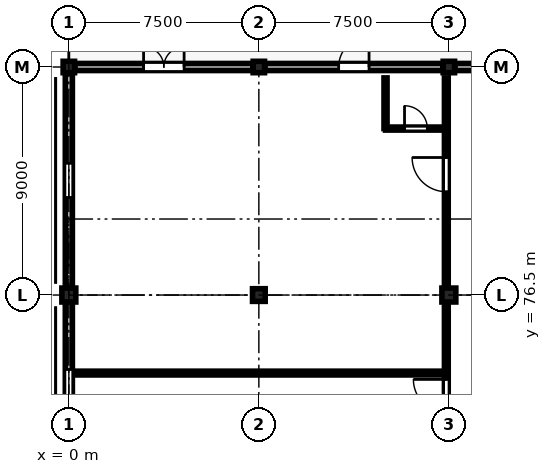
"""IFC4 building model, lengths in metres.
Left out: names, types, materials, properties, quantities, classifications, styles, units other than length and angle.
Written with IfcOpenShell. Run it as: python <this file> out.ifc"""

import sys

from ifc_helpers import new_model, si_unit, direction, frame, frame_2d, origin, origin_2d, place, context, subcontext, project, spatial, rectangle, extrude, element, fill, save


model = new_model("IFC4")
c1 = context("Model", 3, precision=1e-05, world=origin(), true_north=direction((0.0, 1.0)))
c2 = subcontext(c1, "Body", "Model", "MODEL_VIEW")
j1 = project(units=[si_unit("LENGTHUNIT", "METRE"), si_unit("PLANEANGLEUNIT", "RADIAN")], contexts=[c1])
p1 = place(None, origin())
s1 = spatial("IfcSite", under=j1, at=p1, CompositionType="ELEMENT")
p2 = place(p1, origin())
s2 = spatial("IfcBuilding", under=s1, at=p2, CompositionType="ELEMENT")
p3 = place(p2, frame((0.0, 0.0, 25.95)))
s3 = spatial("IfcBuildingStorey", under=s2, at=p3, CompositionType="ELEMENT", Elevation=25.95)
p4 = place(p3, frame((0.0, 76.5, 0.0), z_axis=(0.0, 0.0, 1.0), x_axis=(1.0, 0.0, 0.0)))
e1 = element("IfcColumn", 1, at=p4, inside=s3, PredefinedType="COLUMN", context=c2, shape_type="SweptSolid", body=[
    extrude(rectangle(XDim=0.55, YDim=0.55, at=origin_2d()), origin(), (0.0, 0.0, 1.0), 4.05),
])
p5 = place(p3, frame((0.0, 85.5, 0.0), z_axis=(0.0, 0.0, 1.0), x_axis=(1.0, 0.0, 0.0)))
e2 = element("IfcColumn", 2, at=p5, inside=s3, PredefinedType="COLUMN", context=c2, shape_type="SweptSolid", body=[
    extrude(rectangle(XDim=0.45, YDim=0.45, at=origin_2d()), origin(), (0.0, 0.0, 1.0), 4.05),
])
p6 = place(p3, frame((7.5, 76.5, 0.0), z_axis=(0.0, 0.0, 1.0), x_axis=(1.0, 0.0, 0.0)))
e3 = element("IfcColumn", 3, at=p6, inside=s3, PredefinedType="COLUMN", context=c2, shape_type="SweptSolid", body=[
    extrude(rectangle(XDim=0.5, YDim=0.5, at=origin_2d()), origin(), (0.0, 0.0, 1.0), 4.05),
])
p7 = place(p3, frame((7.5, 85.5, 0.0), z_axis=(0.0, 0.0, 1.0), x_axis=(1.0, 0.0, 0.0)))
e4 = element("IfcColumn", 4, at=p7, inside=s3, PredefinedType="COLUMN", context=c2, shape_type="SweptSolid", body=[
    extrude(rectangle(XDim=0.45, YDim=0.45, at=origin_2d()), origin(), (0.0, 0.0, 1.0), 4.05),
])
p8 = place(p3, frame((15.0, 76.5, 0.0), z_axis=(0.0, 0.0, 1.0), x_axis=(1.0, 0.0, 0.0)))
e5 = element("IfcColumn", 5, at=p8, inside=s3, PredefinedType="COLUMN", context=c2, shape_type="SweptSolid", body=[
    extrude(rectangle(XDim=0.55, YDim=0.55, at=origin_2d()), origin(), (0.0, 0.0, 1.0), 4.05),
])
p9 = place(p3, frame((15.0, 85.5, 0.0), z_axis=(0.0, 0.0, 1.0), x_axis=(1.0, 0.0, 0.0)))
e6 = element("IfcColumn", 6, at=p9, inside=s3, PredefinedType="COLUMN", context=c2, shape_type="SweptSolid", body=[
    extrude(rectangle(XDim=0.45, YDim=0.45, at=origin_2d()), origin(), (0.0, 0.0, 1.0), 4.05),
])
p10 = place(p3, frame((0.0, 69.26, 0.0), z_axis=(0.0, 0.0, 1.0), x_axis=(0.0, 1.0, 0.0)))
e7 = element("IfcWall", 7, at=p10, inside=s3, PredefinedType="STANDARD", context=c2, shape_type="SweptSolid", body=[
    extrude(rectangle(XDim=6.955, YDim=0.28, at=frame_2d((3.478, 0.0))), origin(), (0.0, 0.0, 1.0), 3.17),
])
p11 = place(p10, frame((2.653, 0.0, 0.85)))
e8 = element("IfcOpeningElement", 8, at=p11, cuts=e7, PredefinedType="OPENING", context=c2, shape_type="SweptSolid", body=[
    extrude(rectangle(XDim=1.65, YDim=2.04, at=frame_2d((0.825, 1.02))), frame((0.0, 0.15, 0.0), z_axis=(0.0, -1.0, 0.0), x_axis=(1.0, 0.0, 0.0)), (0.0, 0.0, 1.0), 0.3),
])
p12 = place(p3, frame((0.235, 85.5, 0.0), z_axis=(0.0, 0.0, 1.0), x_axis=(1.0, 0.0, 0.0)))
e9 = element("IfcWall", 9, at=p12, inside=s3, PredefinedType="STANDARD", context=c2, shape_type="SweptSolid", body=[
    extrude(rectangle(XDim=7.03, YDim=0.28, at=frame_2d((3.515, 0.0))), origin(), (0.0, 0.0, 1.0), 3.17),
])
p13 = place(p12, frame((2.715, 0.0, 0.0)))
e10 = element("IfcOpeningElement", 10, at=p13, cuts=e9, PredefinedType="OPENING", context=c2, shape_type="SweptSolid", body=[
    extrude(rectangle(XDim=1.6, YDim=2.35, at=frame_2d((0.8, 1.175))), frame((0.0, 0.15, 0.0), z_axis=(0.0, -1.0, 0.0), x_axis=(1.0, 0.0, 0.0)), (0.0, 0.0, 1.0), 0.3),
])
p14 = place(p3, frame((0.0, 76.785, 0.0), z_axis=(0.0, 0.0, 1.0), x_axis=(0.0, 1.0, 0.0)))
e11 = element("IfcWall", 11, at=p14, inside=s3, PredefinedType="STANDARD", context=c2, shape_type="SweptSolid", body=[
    extrude(rectangle(XDim=8.48, YDim=0.28, at=frame_2d((4.24, 0.0))), origin(), (0.0, 0.0, 1.0), 3.22),
])
p15 = place(p14, frame((3.565, 0.0, 0.85)))
e12 = element("IfcOpeningElement", 12, at=p15, cuts=e11, PredefinedType="OPENING", context=c2, shape_type="SweptSolid", body=[
    extrude(rectangle(XDim=1.35, YDim=2.09, at=frame_2d((0.675, 1.045))), frame((0.0, 0.15, 0.0), z_axis=(0.0, -1.0, 0.0), x_axis=(1.0, 0.0, 0.0)), (0.0, 0.0, 1.0), 0.3),
])
p16 = place(p3, frame((7.735, 85.5, 0.0), z_axis=(0.0, 0.0, 1.0), x_axis=(1.0, 0.0, 0.0)))
e13 = element("IfcWall", 13, at=p16, inside=s3, PredefinedType="STANDARD", context=c2, shape_type="SweptSolid", body=[
    extrude(rectangle(XDim=7.03, YDim=0.28, at=frame_2d((3.515, 0.0))), origin(), (0.0, 0.0, 1.0), 3.17),
])
p17 = place(p16, frame((2.915, 0.0, 0.0)))
e14 = element("IfcOpeningElement", 14, at=p17, cuts=e13, PredefinedType="OPENING", context=c2, shape_type="SweptSolid", body=[
    extrude(rectangle(XDim=1.2, YDim=2.3, at=frame_2d((0.6, 1.15))), frame((0.0, 0.15, 0.0), z_axis=(0.0, -1.0, 0.0), x_axis=(1.0, 0.0, 0.0)), (0.0, 0.0, 1.0), 0.3),
])
p18 = place(p3, frame((15.235, 85.5, 0.0), z_axis=(0.0, 0.0, 1.0), x_axis=(1.0, 0.0, 0.0)))
e15 = element("IfcWall", 15, at=p18, inside=s3, PredefinedType="STANDARD", context=c2, shape_type="SweptSolid", body=[
    extrude(rectangle(XDim=7.03, YDim=0.28, at=frame_2d((3.515, 0.0))), origin(), (0.0, 0.0, 1.0), 3.17),
])
p19 = place(p18, frame((2.715, 0.0, 0.0)))
e16 = element("IfcOpeningElement", 16, at=p19, cuts=e15, PredefinedType="OPENING", context=c2, shape_type="SweptSolid", body=[
    extrude(rectangle(XDim=1.6, YDim=2.35, at=frame_2d((0.8, 1.175))), frame((0.0, 0.15, 0.0), z_axis=(0.0, -1.0, 0.0), x_axis=(1.0, 0.0, 0.0)), (0.0, 0.0, 1.0), 0.3),
])
p20 = place(p3, frame((14.9, 61.93, 0.0), z_axis=(0.0, 0.0, 1.0), x_axis=(0.0, 1.0, 0.0)))
e17 = element("IfcWall", 17, at=p20, inside=s3, PredefinedType="PARTITIONING", context=c2, shape_type="SweptSolid", body=[
    extrude(rectangle(XDim=11.49, YDim=0.15, at=frame_2d((5.745, 0.0))), origin(), (0.0, 0.0, 1.0), 3.205),
])
p21 = place(p20, frame((9.94, 0.0, 0.0)))
e18 = element("IfcOpeningElement", 18, at=p21, cuts=e17, PredefinedType="OPENING", context=c2, shape_type="SweptSolid", body=[
    extrude(rectangle(XDim=1.3, YDim=2.2, at=frame_2d((0.65, 1.1))), frame((0.0, 0.085, 0.0), z_axis=(0.0, -1.0, 0.0), x_axis=(1.0, 0.0, 0.0)), (0.0, 0.0, 1.0), 0.17),
])
p22 = place(p3, frame((14.9, 73.58, 0.0), z_axis=(0.0, 0.0, 1.0), x_axis=(0.0, 1.0, 0.0)))
e19 = element("IfcWall", 19, at=p22, inside=s3, PredefinedType="PARTITIONING", context=c2, shape_type="SweptSolid", body=[
    extrude(rectangle(XDim=11.49, YDim=0.15, at=frame_2d((5.745, 0.0))), origin(), (0.0, 0.0, 1.0), 3.055),
])
p23 = place(p22, frame((6.998, 0.0, 0.0)))
e20 = element("IfcOpeningElement", 20, at=p23, cuts=e19, PredefinedType="OPENING", context=c2, shape_type="SweptSolid", body=[
    extrude(rectangle(XDim=1.35, YDim=2.25, at=frame_2d((0.675, 1.125))), frame((0.0, 0.085, 0.0), z_axis=(0.0, -1.0, 0.0), x_axis=(1.0, 0.0, 0.0)), (0.0, 0.0, 1.0), 0.17),
])
p24 = place(p3, frame((12.5, 83.07, 0.0), z_axis=(0.0, 0.0, 1.0), x_axis=(1.0, 0.0, 0.0)))
e21 = element("IfcWall", 21, at=p24, inside=s3, PredefinedType="PARTITIONING", context=c2, shape_type="SweptSolid", body=[
    extrude(rectangle(XDim=2.4, YDim=0.12, at=frame_2d((1.2, 0.0))), origin(), (0.0, 0.0, 1.0), 3.755),
])
p25 = place(p24, frame((0.75, 0.0, 0.0)))
e22 = element("IfcOpeningElement", 22, at=p25, cuts=e21, PredefinedType="OPENING", context=c2, shape_type="SweptSolid", body=[
    extrude(rectangle(XDim=0.9, YDim=2.1, at=frame_2d((0.45, 1.05))), frame((0.0, 0.07, 0.0), z_axis=(0.0, -1.0, 0.0), x_axis=(1.0, 0.0, 0.0)), (0.0, 0.0, 1.0), 0.14),
])
p26 = place(p3, frame((12.5, 83.07, 0.0), z_axis=(0.0, 0.0, 1.0), x_axis=(0.0, 1.0, 0.0)))
e23 = element("IfcWall", 23, at=p26, inside=s3, PredefinedType="PARTITIONING", context=c2, shape_type="SweptSolid", body=[
    extrude(rectangle(XDim=2.0, YDim=0.12, at=frame_2d((1.0, 0.0))), origin(), (0.0, 0.0, 1.0), 3.755),
])
p27 = place(p3, frame((0.35, 73.42, 0.0), z_axis=(0.0, 0.0, 1.0), x_axis=(1.0, 0.0, 0.0)))
e24 = element("IfcWall", 24, at=p27, inside=s3, PredefinedType="PARTITIONING", context=c2, shape_type="SweptSolid", body=[
    extrude(rectangle(XDim=14.55, YDim=0.15, at=frame_2d((7.275, 0.0))), origin(), (0.0, 0.0, 1.0), 3.755),
])
p28 = place(p11, origin())
e25 = element("IfcWindow", 25, at=p28, inside=s3, PartitioningType="SINGLE_PANEL", PredefinedType="WINDOW", context=c2, shape_type="SweptSolid", body=[
    extrude(rectangle(XDim=1.65, YDim=2.04, at=frame_2d((0.825, 1.02))), frame((0.0, 0.03, 0.0), z_axis=(0.0, -1.0, 0.0), x_axis=(1.0, 0.0, 0.0)), (0.0, 0.0, 1.0), 0.06),
])
fill(e8, e25)
p29 = place(p13, origin())
e26 = element("IfcDoor", 26, at=p29, inside=s3, OperationType="DOUBLE_DOOR_SINGLE_SWING", PredefinedType="DOOR", context=c2, shape_type="SweptSolid", body=[
    extrude(rectangle(XDim=1.6, YDim=2.35, at=frame_2d((0.8, 1.175))), frame((0.0, 0.025, 0.0), z_axis=(0.0, -1.0, 0.0), x_axis=(1.0, 0.0, 0.0)), (0.0, 0.0, 1.0), 0.05),
])
fill(e10, e26)
p30 = place(p15, origin())
e27 = element("IfcWindow", 27, at=p30, inside=s3, PartitioningType="SINGLE_PANEL", PredefinedType="WINDOW", context=c2, shape_type="SweptSolid", body=[
    extrude(rectangle(XDim=1.35, YDim=2.09, at=frame_2d((0.675, 1.045))), frame((0.0, 0.03, 0.0), z_axis=(0.0, -1.0, 0.0), x_axis=(1.0, 0.0, 0.0)), (0.0, 0.0, 1.0), 0.06),
])
fill(e12, e27)
p31 = place(p17, origin())
e28 = element("IfcDoor", 28, at=p31, inside=s3, OperationType="SINGLE_SWING_RIGHT", PredefinedType="DOOR", context=c2, shape_type="SweptSolid", body=[
    extrude(rectangle(XDim=1.2, YDim=2.3, at=frame_2d((0.6, 1.15))), frame((0.0, 0.025, 0.0), z_axis=(0.0, -1.0, 0.0), x_axis=(1.0, 0.0, 0.0)), (0.0, 0.0, 1.0), 0.05),
])
fill(e14, e28)
p32 = place(p21, origin())
e29 = element("IfcDoor", 29, at=p32, inside=s3, OperationType="SINGLE_SWING_RIGHT", PredefinedType="DOOR", context=c2, shape_type="SweptSolid", body=[
    extrude(rectangle(XDim=1.3, YDim=2.2, at=frame_2d((0.65, 1.1))), frame((0.0, 0.025, 0.0), z_axis=(0.0, -1.0, 0.0), x_axis=(1.0, 0.0, 0.0)), (0.0, 0.0, 1.0), 0.05),
])
fill(e18, e29)
p33 = place(p23, origin())
e30 = element("IfcDoor", 30, at=p33, inside=s3, OperationType="SINGLE_SWING_RIGHT", PredefinedType="DOOR", context=c2, shape_type="SweptSolid", body=[
    extrude(rectangle(XDim=1.35, YDim=2.25, at=frame_2d((0.675, 1.125))), frame((0.0, 0.025, 0.0), z_axis=(0.0, -1.0, 0.0), x_axis=(1.0, 0.0, 0.0)), (0.0, 0.0, 1.0), 0.05),
])
fill(e20, e30)
p34 = place(p25, origin())
e31 = element("IfcDoor", 31, at=p34, inside=s3, OperationType="SINGLE_SWING_LEFT", PredefinedType="DOOR", context=c2, shape_type="SweptSolid", body=[
    extrude(rectangle(XDim=0.9, YDim=2.1, at=frame_2d((0.45, 1.05))), frame((0.0, 0.025, 0.0), z_axis=(0.0, -1.0, 0.0), x_axis=(1.0, 0.0, 0.0)), (0.0, 0.0, 1.0), 0.05),
])
fill(e22, e31)
save(model, sys.argv[1])
